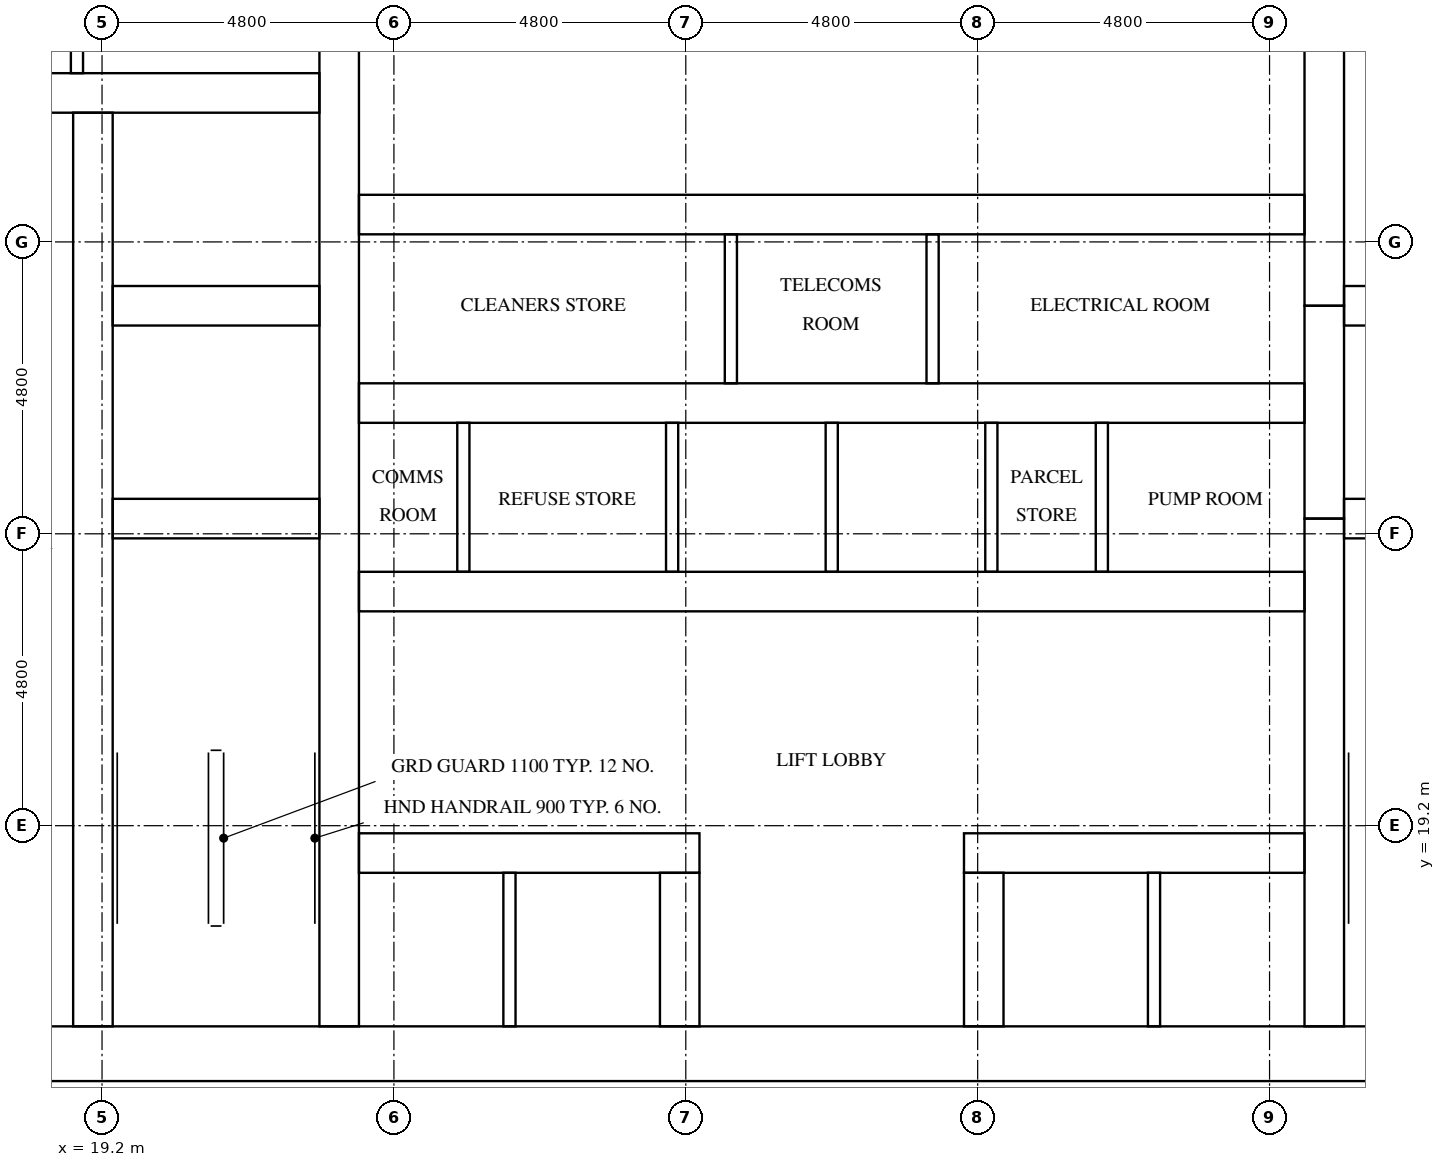
"""IFC4 building model, lengths in metres.
Left out: names, types, materials, properties, quantities, classifications, styles, units other than length and angle.
Written with IfcOpenShell. Run it as: python <this file> out.ifc"""

import sys

from ifc_helpers import new_model, si_unit, direction, frame, frame_2d, origin, place, context, subcontext, project, spatial, rectangle, extrude, element, fill, save


model = new_model("IFC4")
c1 = context("Model", 3, precision=1e-05, world=origin(), true_north=direction((0.0, 1.0)))
c2 = subcontext(c1, "Body", "Model", "MODEL_VIEW")
j1 = project(units=[si_unit("LENGTHUNIT", "METRE"), si_unit("PLANEANGLEUNIT", "RADIAN")], contexts=[c1])
p1 = place(None, origin())
s1 = spatial("IfcSite", under=j1, at=p1, CompositionType="ELEMENT")
p2 = place(p1, origin())
s2 = spatial("IfcBuilding", under=s1, at=p2, CompositionType="ELEMENT")
p3 = place(p2, frame((0.0, 0.0, 99.7)))
s3 = spatial("IfcBuildingStorey", under=s2, at=p3, CompositionType="ELEMENT", Elevation=99.7)
p4 = place(p3, frame((15.0, 15.45, 0.0), z_axis=(0.0, 0.0, 1.0), x_axis=(1.0, 0.0, 0.0)))
e1 = element("IfcWall", 1, at=p4, inside=s3, PredefinedType="SHEAR", context=c2, shape_type="SweptSolid", body=[
    extrude(rectangle(XDim=32.4, YDim=0.9, at=frame_2d((16.2, 0.0))), origin(), (0.0, 0.0, 1.0), 3.2),
])
p5 = place(p4, frame((15.3, 0.0, 0.0)))
e2 = element("IfcOpeningElement", 2, at=p5, cuts=e1, PredefinedType="OPENING", context=c2, shape_type="SweptSolid", body=[
    extrude(rectangle(XDim=1.8, YDim=2.1, at=frame_2d((0.9, 1.05))), frame((0.0, 0.46, 0.0), z_axis=(0.0, -1.0, 0.0), x_axis=(1.0, 0.0, 0.0)), (0.0, 0.0, 1.0), 0.92),
])
p6 = place(p3, frame((19.05, 15.9, 0.0), z_axis=(0.0, 0.0, 1.0), x_axis=(0.0, 1.0, 0.0)))
e3 = element("IfcWall", 3, at=p6, inside=s3, PredefinedType="SHEAR", context=c2, shape_type="SweptSolid", body=[
    extrude(rectangle(XDim=15.025, YDim=0.65, at=frame_2d((7.513, 0.0))), origin(), (0.0, 0.0, 1.0), 3.2),
])
p7 = place(p6, frame((9.55, 0.0, 0.0)))
e4 = element("IfcOpeningElement", 4, at=p7, cuts=e3, PredefinedType="OPENING", context=c2, shape_type="SweptSolid", body=[
    extrude(rectangle(XDim=1.1, YDim=2.1, at=frame_2d((0.55, 1.05))), frame((0.0, 0.335, 0.0), z_axis=(0.0, -1.0, 0.0), x_axis=(1.0, 0.0, 0.0)), (0.0, 0.0, 1.0), 0.67),
])
p8 = place(p6, frame((13.05, 0.0, 0.0)))
e5 = element("IfcOpeningElement", 5, at=p8, cuts=e3, PredefinedType="OPENING", context=c2, shape_type="SweptSolid", body=[
    extrude(rectangle(XDim=1.1, YDim=2.1, at=frame_2d((0.55, 1.05))), frame((0.0, 0.335, 0.0), z_axis=(0.0, -1.0, 0.0), x_axis=(1.0, 0.0, 0.0)), (0.0, 0.0, 1.0), 0.67),
])
p9 = place(p6, frame((0.3, 0.0, 0.0)))
e6 = element("IfcOpeningElement", 6, at=p9, cuts=e3, PredefinedType="OPENING", context=c2, shape_type="SweptSolid", body=[
    extrude(rectangle(XDim=1.2, YDim=2.1, at=frame_2d((0.6, 1.05))), frame((0.0, 0.335, 0.0), z_axis=(0.0, -1.0, 0.0), x_axis=(1.0, 0.0, 0.0)), (0.0, 0.0, 1.0), 0.67),
])
p10 = place(p3, frame((23.1, 15.9, 0.0), z_axis=(0.0, 0.0, 1.0), x_axis=(0.0, 1.0, 0.0)))
e7 = element("IfcWall", 7, at=p10, inside=s3, PredefinedType="SHEAR", context=c2, shape_type="SweptSolid", body=[
    extrude(rectangle(XDim=21.0, YDim=0.65, at=frame_2d((10.5, 0.0))), origin(), (0.0, 0.0, 1.0), 3.2),
])
p11 = place(p3, frame((39.3, 15.9, 0.0), z_axis=(0.0, 0.0, 1.0), x_axis=(0.0, 1.0, 0.0)))
e8 = element("IfcWall", 8, at=p11, inside=s3, PredefinedType="SHEAR", context=c2, shape_type="SweptSolid", body=[
    extrude(rectangle(XDim=8.35, YDim=0.65, at=frame_2d((4.175, 0.0))), origin(), (0.0, 0.0, 1.0), 3.2),
])
p12 = place(p3, frame((39.3, 24.25, 0.0), z_axis=(0.0, 0.0, 1.0), x_axis=(0.0, 1.0, 0.0)))
e9 = element("IfcWall", 9, at=p12, inside=s3, PredefinedType="SHEAR", context=c2, shape_type="SweptSolid", body=[
    extrude(rectangle(XDim=3.5, YDim=0.65, at=frame_2d((1.75, 0.0))), origin(), (0.0, 0.0, 1.0), 3.2),
])
p13 = place(p3, frame((39.3, 27.75, 0.0), z_axis=(0.0, 0.0, 1.0), x_axis=(0.0, 1.0, 0.0)))
e10 = element("IfcWall", 10, at=p13, inside=s3, PredefinedType="SHEAR", context=c2, shape_type="SweptSolid", body=[
    extrude(rectangle(XDim=9.15, YDim=0.65, at=frame_2d((4.575, 0.0))), origin(), (0.0, 0.0, 1.0), 3.2),
])
for number, where, z_axis, x_axis in (
    (11, (19.375, 24.25, 0.0), (0.0, 0.0, 1.0), (1.0, 0.0, 0.0)),
    (12, (19.375, 27.75, 0.0), (0.0, 0.0, 1.0), (1.0, 0.0, 0.0)),
):
    element("IfcWall", number, at=place(p3, frame(where, z_axis=z_axis, x_axis=x_axis)), inside=s3, PredefinedType="SHEAR", context=c2, shape_type="SweptSolid", body=[
        extrude(rectangle(XDim=3.4, YDim=0.65, at=frame_2d((1.7, 0.0))), origin(), (0.0, 0.0, 1.0), 3.2),
    ])
p14 = place(p3, frame((15.9, 31.25, 0.0), z_axis=(0.0, 0.0, 1.0), x_axis=(1.0, 0.0, 0.0)))
e13 = element("IfcWall", 13, at=p14, inside=s3, PredefinedType="SHEAR", context=c2, shape_type="SweptSolid", body=[
    extrude(rectangle(XDim=6.875, YDim=0.65, at=frame_2d((3.438, 0.0))), origin(), (0.0, 0.0, 1.0), 3.2),
])
for number, where, z_axis, x_axis in (
    (14, (39.625, 24.25, 0.0), (0.0, 0.0, 1.0), (1.0, 0.0, 0.0)),
    (15, (39.625, 27.75, 0.0), (0.0, 0.0, 1.0), (1.0, 0.0, 0.0)),
):
    element("IfcWall", number, at=place(p3, frame(where, z_axis=z_axis, x_axis=x_axis)), inside=s3, PredefinedType="SHEAR", context=c2, shape_type="SweptSolid", body=[
        extrude(rectangle(XDim=3.4, YDim=0.65, at=frame_2d((1.7, 0.0))), origin(), (0.0, 0.0, 1.0), 3.2),
    ])
p15 = place(p3, frame((23.425, 18.75, 0.0), z_axis=(0.0, 0.0, 1.0), x_axis=(1.0, 0.0, 0.0)))
e16 = element("IfcWall", 16, at=p15, inside=s3, PredefinedType="SHEAR", context=c2, shape_type="SweptSolid", body=[
    extrude(rectangle(XDim=5.6, YDim=0.65, at=frame_2d((2.8, 0.0))), origin(), (0.0, 0.0, 1.0), 3.2),
])
p16 = place(p15, frame((0.637, 0.0, 0.0)))
e17 = element("IfcOpeningElement", 17, at=p16, cuts=e16, PredefinedType="OPENING", context=c2, shape_type="SweptSolid", body=[
    extrude(rectangle(XDim=1.1, YDim=2.1, at=frame_2d((0.55, 1.05))), frame((0.0, 0.335, 0.0), z_axis=(0.0, -1.0, 0.0), x_axis=(1.0, 0.0, 0.0)), (0.0, 0.0, 1.0), 0.67),
])
p17 = place(p15, frame((3.212, 0.0, 0.0)))
e18 = element("IfcOpeningElement", 18, at=p17, cuts=e16, PredefinedType="OPENING", context=c2, shape_type="SweptSolid", body=[
    extrude(rectangle(XDim=1.1, YDim=2.1, at=frame_2d((0.55, 1.05))), frame((0.0, 0.335, 0.0), z_axis=(0.0, -1.0, 0.0), x_axis=(1.0, 0.0, 0.0)), (0.0, 0.0, 1.0), 0.67),
])
p18 = place(p3, frame((33.375, 18.75, 0.0), z_axis=(0.0, 0.0, 1.0), x_axis=(1.0, 0.0, 0.0)))
e19 = element("IfcWall", 19, at=p18, inside=s3, PredefinedType="SHEAR", context=c2, shape_type="SweptSolid", body=[
    extrude(rectangle(XDim=5.6, YDim=0.65, at=frame_2d((2.8, 0.0))), origin(), (0.0, 0.0, 1.0), 3.2),
])
p19 = place(p18, frame((1.288, 0.0, 0.0)))
e20 = element("IfcOpeningElement", 20, at=p19, cuts=e19, PredefinedType="OPENING", context=c2, shape_type="SweptSolid", body=[
    extrude(rectangle(XDim=1.1, YDim=2.1, at=frame_2d((0.55, 1.05))), frame((0.0, 0.335, 0.0), z_axis=(0.0, -1.0, 0.0), x_axis=(1.0, 0.0, 0.0)), (0.0, 0.0, 1.0), 0.67),
])
p20 = place(p18, frame((3.863, 0.0, 0.0)))
e21 = element("IfcOpeningElement", 21, at=p20, cuts=e19, PredefinedType="OPENING", context=c2, shape_type="SweptSolid", body=[
    extrude(rectangle(XDim=1.1, YDim=2.1, at=frame_2d((0.55, 1.05))), frame((0.0, 0.335, 0.0), z_axis=(0.0, -1.0, 0.0), x_axis=(1.0, 0.0, 0.0)), (0.0, 0.0, 1.0), 0.67),
])
p21 = place(p3, frame((23.425, 23.05, 0.0), z_axis=(0.0, 0.0, 1.0), x_axis=(1.0, 0.0, 0.0)))
e22 = element("IfcWall", 22, at=p21, inside=s3, PredefinedType="SHEAR", context=c2, shape_type="SweptSolid", body=[
    extrude(rectangle(XDim=15.55, YDim=0.65, at=frame_2d((7.775, 0.0))), origin(), (0.0, 0.0, 1.0), 3.2),
])
p22 = place(p21, frame((0.309, 0.0, 0.0)))
e23 = element("IfcOpeningElement", 23, at=p22, cuts=e22, PredefinedType="OPENING", context=c2, shape_type="SweptSolid", body=[
    extrude(rectangle(XDim=1.0, YDim=2.1, at=frame_2d((0.5, 1.05))), frame((0.0, 0.335, 0.0), z_axis=(0.0, -1.0, 0.0), x_axis=(1.0, 0.0, 0.0)), (0.0, 0.0, 1.0), 0.67),
])
p23 = place(p21, frame((2.934, 0.0, 0.0)))
e24 = element("IfcOpeningElement", 24, at=p23, cuts=e22, PredefinedType="OPENING", context=c2, shape_type="SweptSolid", body=[
    extrude(rectangle(XDim=1.0, YDim=2.1, at=frame_2d((0.5, 1.05))), frame((0.0, 0.335, 0.0), z_axis=(0.0, -1.0, 0.0), x_axis=(1.0, 0.0, 0.0)), (0.0, 0.0, 1.0), 0.67),
])
p24 = place(p21, frame((10.809, 0.0, 0.0)))
e25 = element("IfcOpeningElement", 25, at=p24, cuts=e22, PredefinedType="OPENING", context=c2, shape_type="SweptSolid", body=[
    extrude(rectangle(XDim=1.0, YDim=2.1, at=frame_2d((0.5, 1.05))), frame((0.0, 0.335, 0.0), z_axis=(0.0, -1.0, 0.0), x_axis=(1.0, 0.0, 0.0)), (0.0, 0.0, 1.0), 0.67),
])
p25 = place(p21, frame((13.434, 0.0, 0.0)))
e26 = element("IfcOpeningElement", 26, at=p25, cuts=e22, PredefinedType="OPENING", context=c2, shape_type="SweptSolid", body=[
    extrude(rectangle(XDim=1.0, YDim=2.1, at=frame_2d((0.5, 1.05))), frame((0.0, 0.335, 0.0), z_axis=(0.0, -1.0, 0.0), x_axis=(1.0, 0.0, 0.0)), (0.0, 0.0, 1.0), 0.67),
])
p26 = place(p3, frame((23.425, 26.15, 0.0), z_axis=(0.0, 0.0, 1.0), x_axis=(1.0, 0.0, 0.0)))
e27 = element("IfcWall", 27, at=p26, inside=s3, PredefinedType="SHEAR", context=c2, shape_type="SweptSolid", body=[
    extrude(rectangle(XDim=15.55, YDim=0.65, at=frame_2d((7.775, 0.0))), origin(), (0.0, 0.0, 1.0), 3.2),
])
p27 = place(p3, frame((23.425, 29.25, 0.0), z_axis=(0.0, 0.0, 1.0), x_axis=(1.0, 0.0, 0.0)))
e28 = element("IfcWall", 28, at=p27, inside=s3, PredefinedType="SHEAR", context=c2, shape_type="SweptSolid", body=[
    extrude(rectangle(XDim=15.55, YDim=0.65, at=frame_2d((7.775, 0.0))), origin(), (0.0, 0.0, 1.0), 3.2),
])
p28 = place(p27, frame((2.508, 0.0, 0.0)))
e29 = element("IfcOpeningElement", 29, at=p28, cuts=e28, PredefinedType="OPENING", context=c2, shape_type="SweptSolid", body=[
    extrude(rectangle(XDim=1.0, YDim=2.1, at=frame_2d((0.5, 1.05))), frame((0.0, 0.335, 0.0), z_axis=(0.0, -1.0, 0.0), x_axis=(1.0, 0.0, 0.0)), (0.0, 0.0, 1.0), 0.67),
])
p29 = place(p27, frame((7.275, 0.0, 0.0)))
e30 = element("IfcOpeningElement", 30, at=p29, cuts=e28, PredefinedType="OPENING", context=c2, shape_type="SweptSolid", body=[
    extrude(rectangle(XDim=1.0, YDim=2.1, at=frame_2d((0.5, 1.05))), frame((0.0, 0.335, 0.0), z_axis=(0.0, -1.0, 0.0), x_axis=(1.0, 0.0, 0.0)), (0.0, 0.0, 1.0), 0.67),
])
p30 = place(p27, frame((12.042, 0.0, 0.0)))
e31 = element("IfcOpeningElement", 31, at=p30, cuts=e28, PredefinedType="OPENING", context=c2, shape_type="SweptSolid", body=[
    extrude(rectangle(XDim=1.0, YDim=2.1, at=frame_2d((0.5, 1.05))), frame((0.0, 0.335, 0.0), z_axis=(0.0, -1.0, 0.0), x_axis=(1.0, 0.0, 0.0)), (0.0, 0.0, 1.0), 0.67),
])
for number, where, z_axis, x_axis in (
    (32, (28.7, 15.9, 0.0), (0.0, 0.0, 1.0), (0.0, 1.0, 0.0)),
    (33, (33.7, 15.9, 0.0), (0.0, 0.0, 1.0), (0.0, 1.0, 0.0)),
):
    element("IfcWall", number, at=place(p3, frame(where, z_axis=z_axis, x_axis=x_axis)), inside=s3, PredefinedType="SHEAR", context=c2, shape_type="SweptSolid", body=[
        extrude(rectangle(XDim=2.525, YDim=0.65, at=frame_2d((1.263, 0.0))), origin(), (0.0, 0.0, 1.0), 3.2),
    ])
for number, where, z_axis, x_axis in (
    (34, (28.575, 23.375, 0.0), (0.0, 0.0, 1.0), (0.0, 1.0, 0.0)),
    (35, (31.2, 23.375, 0.0), (0.0, 0.0, 1.0), (0.0, 1.0, 0.0)),
    (36, (33.825, 23.375, 0.0), (0.0, 0.0, 1.0), (0.0, 1.0, 0.0)),
):
    element("IfcWall", number, at=place(p3, frame(where, z_axis=z_axis, x_axis=x_axis)), inside=s3, PredefinedType="SOLIDWALL", context=c2, shape_type="SweptSolid", body=[
        extrude(rectangle(XDim=2.45, YDim=0.2, at=frame_2d((1.225, 0.0))), origin(), (0.0, 0.0, 1.0), 3.2),
    ])
for number, where, z_axis, x_axis in (
    (37, (25.9, 15.9, 0.0), (0.0, 0.0, 1.0), (0.0, 1.0, 0.0)),
    (38, (36.5, 15.9, 0.0), (0.0, 0.0, 1.0), (0.0, 1.0, 0.0)),
):
    element("IfcWall", number, at=place(p3, frame(where, z_axis=z_axis, x_axis=x_axis)), inside=s3, PredefinedType="SOLIDWALL", context=c2, shape_type="SweptSolid", body=[
        extrude(rectangle(XDim=2.525, YDim=0.2, at=frame_2d((1.263, 0.0))), origin(), (0.0, 0.0, 1.0), 3.2),
    ])
p31 = place(p3, frame((18.788, 31.575, 0.0), z_axis=(0.0, 0.0, 1.0), x_axis=(0.0, 1.0, 0.0)))
e39 = element("IfcWall", 39, at=p31, inside=s3, PredefinedType="PARTITIONING", context=c2, shape_type="SweptSolid", body=[
    extrude(rectangle(XDim=5.325, YDim=0.2, at=frame_2d((2.663, 0.0))), origin(), (0.0, 0.0, 1.0), 3.2),
])
for number, where, z_axis, x_axis in (
    (40, (25.142, 23.375, 0.0), (0.0, 0.0, 1.0), (0.0, 1.0, 0.0)),
    (41, (35.642, 23.375, 0.0), (0.0, 0.0, 1.0), (0.0, 1.0, 0.0)),
    (42, (29.541, 26.475, 0.0), (0.0, 0.0, 1.0), (0.0, 1.0, 0.0)),
    (43, (32.859, 26.475, 0.0), (0.0, 0.0, 1.0), (0.0, 1.0, 0.0)),
):
    element("IfcWall", number, at=place(p3, frame(where, z_axis=z_axis, x_axis=x_axis)), inside=s3, PredefinedType="PARTITIONING", context=c2, shape_type="SweptSolid", body=[
        extrude(rectangle(XDim=2.45, YDim=0.2, at=frame_2d((1.225, 0.0))), origin(), (0.0, 0.0, 1.0), 3.2),
    ])
p32 = place(p16, origin())
e44 = element("IfcDoor", 44, at=p32, inside=s3, OperationType="DOUBLE_DOOR_SLIDING", PredefinedType="DOOR", context=c2, shape_type="SweptSolid", body=[
    extrude(rectangle(XDim=1.1, YDim=2.1, at=frame_2d((0.55, 1.05))), frame((0.0, 0.025, 0.0), z_axis=(0.0, -1.0, 0.0), x_axis=(1.0, 0.0, 0.0)), (0.0, 0.0, 1.0), 0.05),
])
fill(e17, e44)
p33 = place(p17, origin())
e45 = element("IfcDoor", 45, at=p33, inside=s3, OperationType="DOUBLE_DOOR_SLIDING", PredefinedType="DOOR", context=c2, shape_type="SweptSolid", body=[
    extrude(rectangle(XDim=1.1, YDim=2.1, at=frame_2d((0.55, 1.05))), frame((0.0, 0.025, 0.0), z_axis=(0.0, -1.0, 0.0), x_axis=(1.0, 0.0, 0.0)), (0.0, 0.0, 1.0), 0.05),
])
fill(e18, e45)
p34 = place(p19, origin())
e46 = element("IfcDoor", 46, at=p34, inside=s3, OperationType="DOUBLE_DOOR_SLIDING", PredefinedType="DOOR", context=c2, shape_type="SweptSolid", body=[
    extrude(rectangle(XDim=1.1, YDim=2.1, at=frame_2d((0.55, 1.05))), frame((0.0, 0.025, 0.0), z_axis=(0.0, -1.0, 0.0), x_axis=(1.0, 0.0, 0.0)), (0.0, 0.0, 1.0), 0.05),
])
fill(e20, e46)
p35 = place(p20, origin())
e47 = element("IfcDoor", 47, at=p35, inside=s3, OperationType="DOUBLE_DOOR_SLIDING", PredefinedType="DOOR", context=c2, shape_type="SweptSolid", body=[
    extrude(rectangle(XDim=1.1, YDim=2.1, at=frame_2d((0.55, 1.05))), frame((0.0, 0.025, 0.0), z_axis=(0.0, -1.0, 0.0), x_axis=(1.0, 0.0, 0.0)), (0.0, 0.0, 1.0), 0.05),
])
fill(e21, e47)
p36 = place(p7, origin())
e48 = element("IfcDoor", 48, at=p36, inside=s3, OperationType="DOUBLE_DOOR_SLIDING", PredefinedType="DOOR", context=c2, shape_type="SweptSolid", body=[
    extrude(rectangle(XDim=1.1, YDim=2.1, at=frame_2d((0.55, 1.05))), frame((0.0, 0.025, 0.0), z_axis=(0.0, -1.0, 0.0), x_axis=(1.0, 0.0, 0.0)), (0.0, 0.0, 1.0), 0.05),
])
fill(e4, e48)
p37 = place(p8, origin())
e49 = element("IfcDoor", 49, at=p37, inside=s3, OperationType="DOUBLE_DOOR_SLIDING", PredefinedType="DOOR", context=c2, shape_type="SweptSolid", body=[
    extrude(rectangle(XDim=1.1, YDim=2.1, at=frame_2d((0.55, 1.05))), frame((0.0, 0.025, 0.0), z_axis=(0.0, -1.0, 0.0), x_axis=(1.0, 0.0, 0.0)), (0.0, 0.0, 1.0), 0.05),
])
fill(e5, e49)
p38 = place(p9, frame((1.2, 0.0, 0.0), z_axis=(0.0, 0.0, 1.0), x_axis=(-1.0, 0.0, 0.0)))
e50 = element("IfcDoor", 50, at=p38, inside=s3, OperationType="SINGLE_SWING_LEFT", PredefinedType="DOOR", context=c2, shape_type="SweptSolid", body=[
    extrude(rectangle(XDim=1.2, YDim=2.1, at=frame_2d((0.6, 1.05))), frame((0.0, 0.025, 0.0), z_axis=(0.0, -1.0, 0.0), x_axis=(1.0, 0.0, 0.0)), (0.0, 0.0, 1.0), 0.05),
])
fill(e6, e50)
p39 = place(p5, frame((1.8, 0.0, 0.0), z_axis=(0.0, 0.0, 1.0), x_axis=(-1.0, 0.0, 0.0)))
e51 = element("IfcDoor", 51, at=p39, inside=s3, OperationType="DOUBLE_DOOR_SINGLE_SWING", PredefinedType="DOOR", context=c2, shape_type="SweptSolid", body=[
    extrude(rectangle(XDim=1.8, YDim=2.1, at=frame_2d((0.9, 1.05))), frame((0.0, 0.025, 0.0), z_axis=(0.0, -1.0, 0.0), x_axis=(1.0, 0.0, 0.0)), (0.0, 0.0, 1.0), 0.05),
])
fill(e2, e51)
p40 = place(p22, frame((1.0, 0.0, 0.0), z_axis=(0.0, 0.0, 1.0), x_axis=(-1.0, 0.0, 0.0)))
e52 = element("IfcDoor", 52, at=p40, inside=s3, OperationType="SINGLE_SWING_RIGHT", PredefinedType="DOOR", context=c2, shape_type="SweptSolid", body=[
    extrude(rectangle(XDim=1.0, YDim=2.1, at=frame_2d((0.5, 1.05))), frame((0.0, 0.025, 0.0), z_axis=(0.0, -1.0, 0.0), x_axis=(1.0, 0.0, 0.0)), (0.0, 0.0, 1.0), 0.05),
])
fill(e23, e52)
p41 = place(p23, frame((1.0, 0.0, 0.0), z_axis=(0.0, 0.0, 1.0), x_axis=(-1.0, 0.0, 0.0)))
e53 = element("IfcDoor", 53, at=p41, inside=s3, OperationType="SINGLE_SWING_LEFT", PredefinedType="DOOR", context=c2, shape_type="SweptSolid", body=[
    extrude(rectangle(XDim=1.0, YDim=2.1, at=frame_2d((0.5, 1.05))), frame((0.0, 0.025, 0.0), z_axis=(0.0, -1.0, 0.0), x_axis=(1.0, 0.0, 0.0)), (0.0, 0.0, 1.0), 0.05),
])
fill(e24, e53)
p42 = place(p24, frame((1.0, 0.0, 0.0), z_axis=(0.0, 0.0, 1.0), x_axis=(-1.0, 0.0, 0.0)))
e54 = element("IfcDoor", 54, at=p42, inside=s3, OperationType="SINGLE_SWING_RIGHT", PredefinedType="DOOR", context=c2, shape_type="SweptSolid", body=[
    extrude(rectangle(XDim=1.0, YDim=2.1, at=frame_2d((0.5, 1.05))), frame((0.0, 0.025, 0.0), z_axis=(0.0, -1.0, 0.0), x_axis=(1.0, 0.0, 0.0)), (0.0, 0.0, 1.0), 0.05),
])
fill(e25, e54)
p43 = place(p25, frame((1.0, 0.0, 0.0), z_axis=(0.0, 0.0, 1.0), x_axis=(-1.0, 0.0, 0.0)))
e55 = element("IfcDoor", 55, at=p43, inside=s3, OperationType="SINGLE_SWING_LEFT", PredefinedType="DOOR", context=c2, shape_type="SweptSolid", body=[
    extrude(rectangle(XDim=1.0, YDim=2.1, at=frame_2d((0.5, 1.05))), frame((0.0, 0.025, 0.0), z_axis=(0.0, -1.0, 0.0), x_axis=(1.0, 0.0, 0.0)), (0.0, 0.0, 1.0), 0.05),
])
fill(e26, e55)
p44 = place(p28, origin())
e56 = element("IfcDoor", 56, at=p44, inside=s3, OperationType="SINGLE_SWING_RIGHT", PredefinedType="DOOR", context=c2, shape_type="SweptSolid", body=[
    extrude(rectangle(XDim=1.0, YDim=2.1, at=frame_2d((0.5, 1.05))), frame((0.0, 0.025, 0.0), z_axis=(0.0, -1.0, 0.0), x_axis=(1.0, 0.0, 0.0)), (0.0, 0.0, 1.0), 0.05),
])
fill(e29, e56)
p45 = place(p29, origin())
e57 = element("IfcDoor", 57, at=p45, inside=s3, OperationType="SINGLE_SWING_LEFT", PredefinedType="DOOR", context=c2, shape_type="SweptSolid", body=[
    extrude(rectangle(XDim=1.0, YDim=2.1, at=frame_2d((0.5, 1.05))), frame((0.0, 0.025, 0.0), z_axis=(0.0, -1.0, 0.0), x_axis=(1.0, 0.0, 0.0)), (0.0, 0.0, 1.0), 0.05),
])
fill(e30, e57)
p46 = place(p30, origin())
e58 = element("IfcDoor", 58, at=p46, inside=s3, OperationType="SINGLE_SWING_RIGHT", PredefinedType="DOOR", context=c2, shape_type="SweptSolid", body=[
    extrude(rectangle(XDim=1.0, YDim=2.1, at=frame_2d((0.5, 1.05))), frame((0.0, 0.025, 0.0), z_axis=(0.0, -1.0, 0.0), x_axis=(1.0, 0.0, 0.0)), (0.0, 0.0, 1.0), 0.05),
])
fill(e31, e58)
save(model, sys.argv[1])
